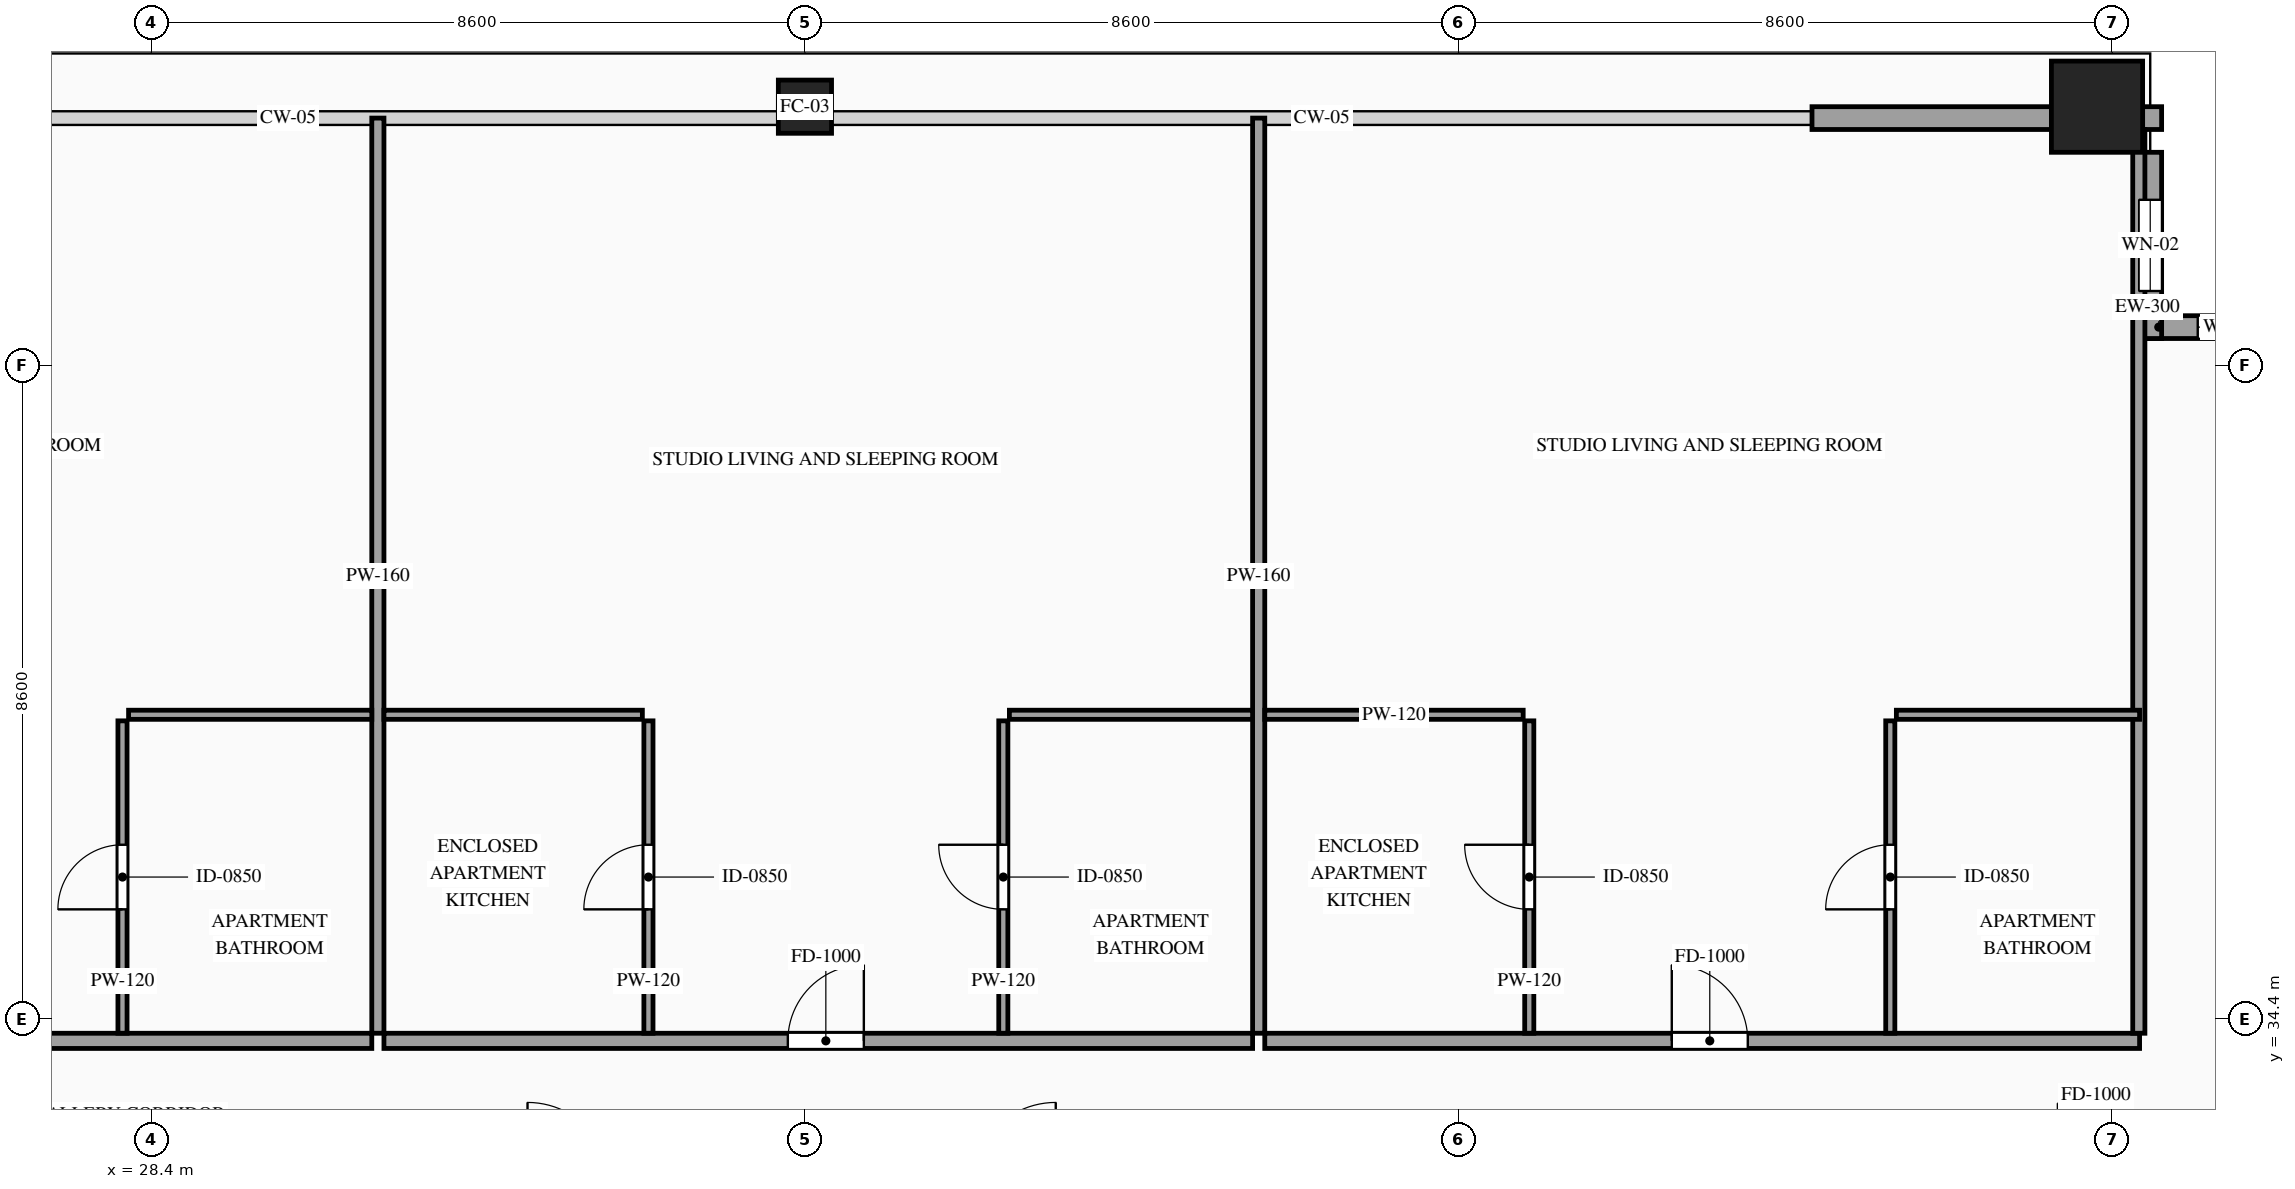
"""IFC4 building model, lengths in metres.
Left out: names, types, materials, properties, quantities, classifications, styles, units other than length and angle.
Written with IfcOpenShell. Run it as: python <this file> out.ifc"""

import sys

from ifc_helpers import new_model, si_unit, direction, frame, frame_2d, origin, origin_2d, place, context, subcontext, project, spatial, rectangle, hollow_rectangle, extrude, source, transform, mapped, element, fill, save


model = new_model("IFC4")
c1 = context("Model", 3, precision=1e-05, world=origin(), true_north=direction((0.0, 1.0)))
c2 = subcontext(c1, "Body", "Model", "MODEL_VIEW")
j1 = project(units=[si_unit("LENGTHUNIT", "METRE"), si_unit("PLANEANGLEUNIT", "RADIAN")], contexts=[c1])
p1 = place(None, origin())
s1 = spatial("IfcSite", under=j1, at=p1, CompositionType="ELEMENT")
p2 = place(p1, origin())
s2 = spatial("IfcBuilding", under=s1, at=p2, CompositionType="ELEMENT")
p3 = place(p2, frame((0.0, 0.0, 238.1)))
s3 = spatial("IfcBuildingStorey", under=s2, at=p3, CompositionType="ELEMENT", Elevation=238.1)
m1 = source(origin(), c2, "Body", "SweptSolid", [
    extrude(hollow_rectangle(XDim=0.7, YDim=0.7, WallThickness=0.032, at=origin_2d()), origin(), (0.0, 0.0, 1.0), 3.5),
])
p4 = place(p3, frame((37.0, 46.4, 0.0), z_axis=(0.0, 0.0, 1.0), x_axis=(1.0, 0.0, 0.0)))
e1 = element("IfcColumn", 1, at=p4, inside=s3, PredefinedType="COLUMN", context=c2, shape_type="MappedRepresentation", body=[
    mapped(m1, transform((0.0, 0.0, 0.0), scale=1.0)),
])
m2 = source(origin(), c2, "Body", "SweptSolid", [
    extrude(hollow_rectangle(XDim=1.2, YDim=1.2, WallThickness=0.055, at=origin_2d()), origin(), (0.0, 0.0, 1.0), 3.5),
])
p5 = place(p3, frame((54.0, 46.4, 0.0), z_axis=(0.0, 0.0, 1.0), x_axis=(1.0, 0.0, 0.0)))
e2 = element("IfcColumn", 2, at=p5, inside=s3, PredefinedType="COLUMN", context=c2, shape_type="MappedRepresentation", body=[
    mapped(m2, transform((0.0, 0.0, 0.0), scale=1.0)),
])
p6 = place(p3, frame((57.0, 43.5, 0.0), z_axis=(0.0, 0.0, 1.0), x_axis=(-1.0, 0.0, 0.0)))
e3 = element("IfcWall", 3, at=p6, inside=s3, PredefinedType="SOLIDWALL", context=c2, shape_type="SweptSolid", body=[
    extrude(rectangle(XDim=2.45, YDim=0.3, at=frame_2d((1.225, 0.0))), origin(), (0.0, 0.0, 1.0), 3.28),
])
p7 = place(p6, frame((0.775, 0.0, 0.85)))
e4 = element("IfcOpeningElement", 4, at=p7, cuts=e3, PredefinedType="OPENING", context=c2, shape_type="SweptSolid", body=[
    extrude(rectangle(XDim=0.9, YDim=1.5, at=frame_2d((0.45, 0.75))), frame((0.0, 0.165, 0.0), z_axis=(0.0, -1.0, 0.0), x_axis=(1.0, 0.0, 0.0)), (0.0, 0.0, 1.0), 0.33),
])
p8 = place(p3, frame((54.7, 43.35, 0.0), z_axis=(0.0, 0.0, 1.0), x_axis=(0.0, 1.0, 0.0)))
e5 = element("IfcWall", 5, at=p8, inside=s3, PredefinedType="SOLIDWALL", context=c2, shape_type="SweptSolid", body=[
    extrude(rectangle(XDim=2.45, YDim=0.3, at=frame_2d((1.225, 0.0))), origin(), (0.0, 0.0, 1.0), 3.28),
])
p9 = place(p8, frame((0.625, 0.0, 0.85)))
e6 = element("IfcOpeningElement", 6, at=p9, cuts=e5, PredefinedType="OPENING", context=c2, shape_type="SweptSolid", body=[
    extrude(rectangle(XDim=1.2, YDim=2.1, at=frame_2d((0.6, 1.05))), frame((0.0, 0.165, 0.0), z_axis=(0.0, -1.0, 0.0), x_axis=(1.0, 0.0, 0.0)), (0.0, 0.0, 1.0), 0.33),
])
m3 = source(origin(), c2, "Body", "SweptSolid", [
    extrude(rectangle(XDim=0.25, YDim=0.3, at=frame_2d((0.125, 0.0))), origin(), (0.0, 0.0, 1.0), 3.28),
])
p10 = place(p3, frame((54.6, 46.25, 0.0), z_axis=(0.0, 0.0, 1.0), x_axis=(1.0, 0.0, 0.0)))
e7 = element("IfcWall", 7, at=p10, inside=s3, PredefinedType="SOLIDWALL", context=c2, shape_type="MappedRepresentation", body=[
    mapped(m3, transform((0.0, 0.0, 0.0), scale=1.0)),
])
m4 = source(origin(), c2, "Body", "SweptSolid", [
    extrude(rectangle(XDim=3.15, YDim=0.3, at=frame_2d((1.575, 0.0))), origin(), (0.0, 0.0, 1.0), 2.835),
])
p11 = place(p3, frame((50.25, 46.25, 0.0), z_axis=(0.0, 0.0, 1.0), x_axis=(1.0, 0.0, 0.0)))
e8 = element("IfcWall", 8, at=p11, inside=s3, PredefinedType="SOLIDWALL", context=c2, shape_type="MappedRepresentation", body=[
    mapped(m4, transform((0.0, 0.0, 0.0), scale=1.0)),
])
p12 = place(p3, frame((19.44, 34.11, 0.0), z_axis=(0.0, 0.0, 1.0), x_axis=(1.0, 0.0, 0.0)))
e9 = element("IfcWall", 9, at=p12, inside=s3, PredefinedType="PARTITIONING", context=c2, shape_type="SweptSolid", body=[
    extrude(rectangle(XDim=11.861, YDim=0.2, at=frame_2d((5.931, 0.0))), origin(), (0.0, 0.0, 1.0), 3.28),
])
p13 = place(p12, frame((5.531, 0.0, 0.0)))
e10 = element("IfcOpeningElement", 10, at=p13, cuts=e9, PredefinedType="OPENING", context=c2, shape_type="SweptSolid", body=[
    extrude(rectangle(XDim=1.0, YDim=2.2, at=frame_2d((0.5, 1.1))), frame((0.0, 0.115, 0.0), z_axis=(0.0, -1.0, 0.0), x_axis=(1.0, 0.0, 0.0)), (0.0, 0.0, 1.0), 0.23),
])
m5 = source(origin(), c2, "Body", "SweptSolid", [
    extrude(rectangle(XDim=12.04, YDim=0.16, at=frame_2d((6.02, 0.0))), origin(), (0.0, 0.0, 1.0), 3.28),
])
p14 = place(p3, frame((31.381, 34.21, 0.0), z_axis=(0.0, 0.0, 1.0), x_axis=(0.0, 1.0, 0.0)))
e11 = element("IfcWall", 11, at=p14, inside=s3, PredefinedType="PARTITIONING", context=c2, shape_type="MappedRepresentation", body=[
    mapped(m5, transform((0.0, 0.0, 0.0), scale=1.0)),
])
m6 = source(origin(), c2, "Body", "SweptSolid", [
    extrude(rectangle(XDim=3.2, YDim=0.12, at=frame_2d((1.6, 0.0))), origin(), (0.0, 0.0, 1.0), 3.28),
])
p15 = place(p3, frame((28.101, 38.4, 0.0), z_axis=(0.0, 0.0, 1.0), x_axis=(1.0, 0.0, 0.0)))
e12 = element("IfcWall", 12, at=p15, inside=s3, PredefinedType="PARTITIONING", context=c2, shape_type="MappedRepresentation", body=[
    mapped(m6, transform((0.0, 0.0, 0.0), scale=1.0)),
])
p16 = place(p3, frame((28.021, 34.21, 0.0), z_axis=(0.0, 0.0, 1.0), x_axis=(0.0, 1.0, 0.0)))
e13 = element("IfcWall", 13, at=p16, inside=s3, PredefinedType="PARTITIONING", context=c2, shape_type="SweptSolid", body=[
    extrude(rectangle(XDim=4.11, YDim=0.12, at=frame_2d((2.055, 0.0))), origin(), (0.0, 0.0, 1.0), 3.28),
])
p17 = place(p16, frame((1.63, 0.0, 0.0)))
e14 = element("IfcOpeningElement", 14, at=p17, cuts=e13, PredefinedType="OPENING", context=c2, shape_type="SweptSolid", body=[
    extrude(rectangle(XDim=0.85, YDim=2.1, at=frame_2d((0.425, 1.05))), frame((0.0, 0.075, 0.0), z_axis=(0.0, -1.0, 0.0), x_axis=(1.0, 0.0, 0.0)), (0.0, 0.0, 1.0), 0.15),
])
p18 = place(p3, frame((31.461, 34.11, 0.0), z_axis=(0.0, 0.0, 1.0), x_axis=(1.0, 0.0, 0.0)))
e15 = element("IfcWall", 15, at=p18, inside=s3, PredefinedType="PARTITIONING", context=c2, shape_type="SweptSolid", body=[
    extrude(rectangle(XDim=11.429, YDim=0.2, at=frame_2d((5.714, 0.0))), origin(), (0.0, 0.0, 1.0), 3.28),
])
p19 = place(p18, frame((5.314, 0.0, 0.0)))
e16 = element("IfcOpeningElement", 16, at=p19, cuts=e15, PredefinedType="OPENING", context=c2, shape_type="SweptSolid", body=[
    extrude(rectangle(XDim=1.0, YDim=2.2, at=frame_2d((0.5, 1.1))), frame((0.0, 0.115, 0.0), z_axis=(0.0, -1.0, 0.0), x_axis=(1.0, 0.0, 0.0)), (0.0, 0.0, 1.0), 0.23),
])
p20 = place(p3, frame((42.97, 34.21, 0.0), z_axis=(0.0, 0.0, 1.0), x_axis=(0.0, 1.0, 0.0)))
e17 = element("IfcWall", 17, at=p20, inside=s3, PredefinedType="PARTITIONING", context=c2, shape_type="MappedRepresentation", body=[
    mapped(m5, transform((0.0, 0.0, 0.0), scale=1.0)),
])
m7 = source(origin(), c2, "Body", "SweptSolid", [
    extrude(rectangle(XDim=3.4, YDim=0.12, at=frame_2d((1.7, 0.0))), origin(), (0.0, 0.0, 1.0), 3.28),
])
p21 = place(p3, frame((31.461, 38.4, 0.0), z_axis=(0.0, 0.0, 1.0), x_axis=(1.0, 0.0, 0.0)))
e18 = element("IfcWall", 18, at=p21, inside=s3, PredefinedType="PARTITIONING", context=c2, shape_type="MappedRepresentation", body=[
    mapped(m7, transform((0.0, 0.0, 0.0), scale=1.0)),
])
p22 = place(p3, frame((34.941, 34.21, 0.0), z_axis=(0.0, 0.0, 1.0), x_axis=(0.0, 1.0, 0.0)))
e19 = element("IfcWall", 19, at=p22, inside=s3, PredefinedType="PARTITIONING", context=c2, shape_type="SweptSolid", body=[
    extrude(rectangle(XDim=4.11, YDim=0.12, at=frame_2d((2.055, 0.0))), origin(), (0.0, 0.0, 1.0), 3.28),
])
p23 = place(p22, frame((1.63, 0.0, 0.0)))
e20 = element("IfcOpeningElement", 20, at=p23, cuts=e19, PredefinedType="OPENING", context=c2, shape_type="SweptSolid", body=[
    extrude(rectangle(XDim=0.85, YDim=2.1, at=frame_2d((0.425, 1.05))), frame((0.0, 0.075, 0.0), z_axis=(0.0, -1.0, 0.0), x_axis=(1.0, 0.0, 0.0)), (0.0, 0.0, 1.0), 0.15),
])
p24 = place(p3, frame((39.69, 38.4, 0.0), z_axis=(0.0, 0.0, 1.0), x_axis=(1.0, 0.0, 0.0)))
e21 = element("IfcWall", 21, at=p24, inside=s3, PredefinedType="PARTITIONING", context=c2, shape_type="MappedRepresentation", body=[
    mapped(m6, transform((0.0, 0.0, 0.0), scale=1.0)),
])
p25 = place(p3, frame((39.61, 34.21, 0.0), z_axis=(0.0, 0.0, 1.0), x_axis=(0.0, 1.0, 0.0)))
e22 = element("IfcWall", 22, at=p25, inside=s3, PredefinedType="PARTITIONING", context=c2, shape_type="SweptSolid", body=[
    extrude(rectangle(XDim=4.11, YDim=0.12, at=frame_2d((2.055, 0.0))), origin(), (0.0, 0.0, 1.0), 3.28),
])
p26 = place(p25, frame((1.63, 0.0, 0.0)))
e23 = element("IfcOpeningElement", 23, at=p26, cuts=e22, PredefinedType="OPENING", context=c2, shape_type="SweptSolid", body=[
    extrude(rectangle(XDim=0.85, YDim=2.1, at=frame_2d((0.425, 1.05))), frame((0.0, 0.075, 0.0), z_axis=(0.0, -1.0, 0.0), x_axis=(1.0, 0.0, 0.0)), (0.0, 0.0, 1.0), 0.15),
])
p27 = place(p3, frame((43.05, 34.11, 0.0), z_axis=(0.0, 0.0, 1.0), x_axis=(1.0, 0.0, 0.0)))
e24 = element("IfcWall", 24, at=p27, inside=s3, PredefinedType="PARTITIONING", context=c2, shape_type="SweptSolid", body=[
    extrude(rectangle(XDim=11.51, YDim=0.2, at=frame_2d((5.755, 0.0))), origin(), (0.0, 0.0, 1.0), 3.28),
])
p28 = place(p27, frame((5.355, 0.0, 0.0)))
e25 = element("IfcOpeningElement", 25, at=p28, cuts=e24, PredefinedType="OPENING", context=c2, shape_type="SweptSolid", body=[
    extrude(rectangle(XDim=1.0, YDim=2.2, at=frame_2d((0.5, 1.1))), frame((0.0, 0.115, 0.0), z_axis=(0.0, -1.0, 0.0), x_axis=(1.0, 0.0, 0.0)), (0.0, 0.0, 1.0), 0.23),
])
m8 = source(origin(), c2, "Body", "SweptSolid", [
    extrude(rectangle(XDim=11.89, YDim=0.16, at=frame_2d((5.945, 0.0))), origin(), (0.0, 0.0, 1.0), 3.28),
])
p29 = place(p3, frame((54.55, 34.21, 0.0), z_axis=(0.0, 0.0, 1.0), x_axis=(0.0, 1.0, 0.0)))
e26 = element("IfcWall", 26, at=p29, inside=s3, PredefinedType="PARTITIONING", context=c2, shape_type="MappedRepresentation", body=[
    mapped(m8, transform((0.0, 0.0, 0.0), scale=1.0)),
])
m9 = source(origin(), c2, "Body", "SweptSolid", [
    extrude(rectangle(XDim=3.4, YDim=0.12, at=frame_2d((1.7, 0.0))), origin(), (0.0, 0.0, 1.0), 3.28),
])
p30 = place(p3, frame((43.05, 38.4, 0.0), z_axis=(0.0, 0.0, 1.0), x_axis=(1.0, 0.0, 0.0)))
e27 = element("IfcWall", 27, at=p30, inside=s3, PredefinedType="PARTITIONING", context=c2, shape_type="MappedRepresentation", body=[
    mapped(m9, transform((0.0, 0.0, 0.0), scale=1.0)),
])
p31 = place(p3, frame((46.53, 34.21, 0.0), z_axis=(0.0, 0.0, 1.0), x_axis=(0.0, 1.0, 0.0)))
e28 = element("IfcWall", 28, at=p31, inside=s3, PredefinedType="PARTITIONING", context=c2, shape_type="SweptSolid", body=[
    extrude(rectangle(XDim=4.11, YDim=0.12, at=frame_2d((2.055, 0.0))), origin(), (0.0, 0.0, 1.0), 3.28),
])
p32 = place(p31, frame((1.63, 0.0, 0.0)))
e29 = element("IfcOpeningElement", 29, at=p32, cuts=e28, PredefinedType="OPENING", context=c2, shape_type="SweptSolid", body=[
    extrude(rectangle(XDim=0.85, YDim=2.1, at=frame_2d((0.425, 1.05))), frame((0.0, 0.075, 0.0), z_axis=(0.0, -1.0, 0.0), x_axis=(1.0, 0.0, 0.0)), (0.0, 0.0, 1.0), 0.15),
])
p33 = place(p3, frame((51.36, 38.4, 0.0), z_axis=(0.0, 0.0, 1.0), x_axis=(1.0, 0.0, 0.0)))
e30 = element("IfcWall", 30, at=p33, inside=s3, PredefinedType="PARTITIONING", context=c2, shape_type="MappedRepresentation", body=[
    mapped(m6, transform((0.0, 0.0, 0.0), scale=1.0)),
])
p34 = place(p3, frame((51.28, 34.21, 0.0), z_axis=(0.0, 0.0, 1.0), x_axis=(0.0, 1.0, 0.0)))
e31 = element("IfcWall", 31, at=p34, inside=s3, PredefinedType="PARTITIONING", context=c2, shape_type="SweptSolid", body=[
    extrude(rectangle(XDim=4.11, YDim=0.12, at=frame_2d((2.055, 0.0))), origin(), (0.0, 0.0, 1.0), 3.28),
])
p35 = place(p34, frame((1.63, 0.0, 0.0)))
e32 = element("IfcOpeningElement", 32, at=p35, cuts=e31, PredefinedType="OPENING", context=c2, shape_type="SweptSolid", body=[
    extrude(rectangle(XDim=0.85, YDim=2.1, at=frame_2d((0.425, 1.05))), frame((0.0, 0.075, 0.0), z_axis=(0.0, -1.0, 0.0), x_axis=(1.0, 0.0, 0.0)), (0.0, 0.0, 1.0), 0.15),
])
m10 = source(origin(), c2, "Body", "SweptSolid", [
    extrude(rectangle(XDim=0.9, YDim=1.5, at=frame_2d((0.45, 0.75))), frame((0.0, 0.03, 0.0), z_axis=(0.0, -1.0, 0.0), x_axis=(1.0, 0.0, 0.0)), (0.0, 0.0, 1.0), 0.06),
])
p36 = place(p7, origin())
e33 = element("IfcWindow", 33, at=p36, inside=s3, PartitioningType="SINGLE_PANEL", PredefinedType="WINDOW", context=c2, shape_type="MappedRepresentation", body=[
    mapped(m10, transform((0.0, 0.0, 0.0), scale=1.0)),
])
fill(e4, e33)
m11 = source(origin(), c2, "Body", "SweptSolid", [
    extrude(rectangle(XDim=1.2, YDim=2.1, at=frame_2d((0.6, 1.05))), frame((0.0, 0.03, 0.0), z_axis=(0.0, -1.0, 0.0), x_axis=(1.0, 0.0, 0.0)), (0.0, 0.0, 1.0), 0.06),
])
p37 = place(p9, origin())
e34 = element("IfcWindow", 34, at=p37, inside=s3, PartitioningType="SINGLE_PANEL", PredefinedType="WINDOW", context=c2, shape_type="MappedRepresentation", body=[
    mapped(m11, transform((0.0, 0.0, 0.0), scale=1.0)),
])
fill(e6, e34)
m12 = source(origin(), c2, "Body", "SweptSolid", [
    extrude(rectangle(XDim=0.85, YDim=2.1, at=frame_2d((0.425, 1.05))), frame((0.0, 0.025, 0.0), z_axis=(0.0, -1.0, 0.0), x_axis=(1.0, 0.0, 0.0)), (0.0, 0.0, 1.0), 0.05),
])
p38 = place(p17, origin())
e35 = element("IfcDoor", 35, at=p38, inside=s3, OperationType="SINGLE_SWING_LEFT", PredefinedType="DOOR", context=c2, shape_type="MappedRepresentation", body=[
    mapped(m12, transform((0.0, 0.0, 0.0), scale=1.0)),
])
fill(e14, e35)
m13 = source(origin(), c2, "Body", "SweptSolid", [
    extrude(rectangle(XDim=1.0, YDim=2.2, at=frame_2d((0.5, 1.1))), frame((0.0, 0.025, 0.0), z_axis=(0.0, -1.0, 0.0), x_axis=(1.0, 0.0, 0.0)), (0.0, 0.0, 1.0), 0.05),
])
p39 = place(p19, origin())
e36 = element("IfcDoor", 36, at=p39, inside=s3, OperationType="SINGLE_SWING_RIGHT", PredefinedType="DOOR", context=c2, shape_type="MappedRepresentation", body=[
    mapped(m13, transform((0.0, 0.0, 0.0), scale=1.0)),
])
fill(e16, e36)
p40 = place(p23, origin())
e37 = element("IfcDoor", 37, at=p40, inside=s3, OperationType="SINGLE_SWING_LEFT", PredefinedType="DOOR", context=c2, shape_type="MappedRepresentation", body=[
    mapped(m12, transform((0.0, 0.0, 0.0), scale=1.0)),
])
fill(e20, e37)
p41 = place(p26, origin())
e38 = element("IfcDoor", 38, at=p41, inside=s3, OperationType="SINGLE_SWING_RIGHT", PredefinedType="DOOR", context=c2, shape_type="MappedRepresentation", body=[
    mapped(m12, transform((0.0, 0.0, 0.0), scale=1.0)),
])
fill(e23, e38)
p42 = place(p28, origin())
e39 = element("IfcDoor", 39, at=p42, inside=s3, OperationType="SINGLE_SWING_LEFT", PredefinedType="DOOR", context=c2, shape_type="MappedRepresentation", body=[
    mapped(m13, transform((0.0, 0.0, 0.0), scale=1.0)),
])
fill(e25, e39)
p43 = place(p32, origin())
e40 = element("IfcDoor", 40, at=p43, inside=s3, OperationType="SINGLE_SWING_RIGHT", PredefinedType="DOOR", context=c2, shape_type="MappedRepresentation", body=[
    mapped(m12, transform((0.0, 0.0, 0.0), scale=1.0)),
])
fill(e29, e40)
p44 = place(p35, origin())
e41 = element("IfcDoor", 41, at=p44, inside=s3, OperationType="SINGLE_SWING_LEFT", PredefinedType="DOOR", context=c2, shape_type="MappedRepresentation", body=[
    mapped(m12, transform((0.0, 0.0, 0.0), scale=1.0)),
])
fill(e32, e41)
save(model, sys.argv[1])
